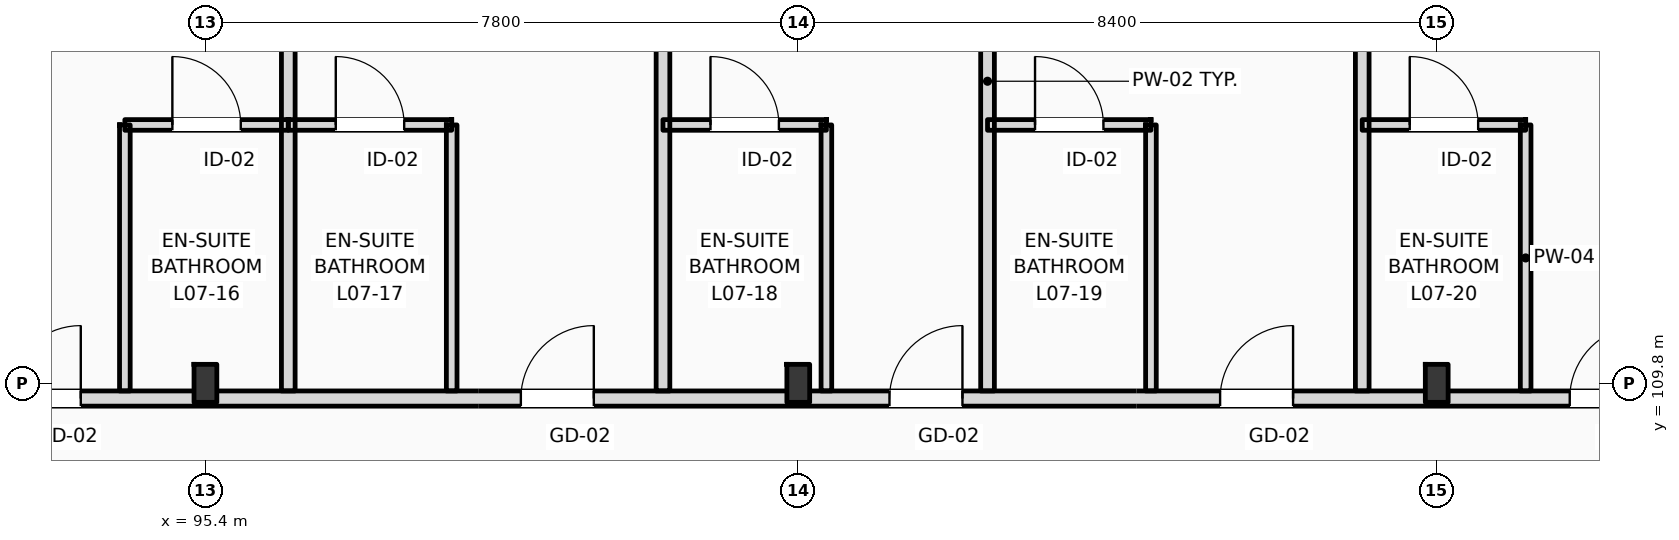
"""IFC4 building model, lengths in metres.
Left out: names, types, materials, properties, quantities, classifications, styles, units other than length and angle.
Written with IfcOpenShell. Run it as: python <this file> out.ifc"""

import sys

from ifc_helpers import new_model, si_unit, direction, frame, frame_2d, origin, origin_2d, place, context, subcontext, project, spatial, rectangle, i_section, extrude, element, fill, save


model = new_model("IFC4")
c1 = context("Model", 3, precision=1e-05, world=origin(), true_north=direction((0.0, 1.0)))
c2 = subcontext(c1, "Body", "Model", "MODEL_VIEW")
j1 = project(units=[si_unit("LENGTHUNIT", "METRE"), si_unit("PLANEANGLEUNIT", "RADIAN")], contexts=[c1])
p1 = place(None, origin())
s1 = spatial("IfcSite", under=j1, at=p1, CompositionType="ELEMENT")
p2 = place(p1, origin())
s2 = spatial("IfcBuilding", under=s1, at=p2, CompositionType="ELEMENT")
p3 = place(p2, frame((0.0, 0.0, 31.8)))
s3 = spatial("IfcBuildingStorey", under=s2, at=p3, CompositionType="ELEMENT", Elevation=31.8)
for number, where, z_axis, x_axis in (
    (1, (95.4, 109.8, 0.0), (0.0, 0.0, 1.0), (1.0, 0.0, 0.0)),
    (2, (103.2, 109.8, 0.0), (0.0, 0.0, 1.0), (1.0, 0.0, 0.0)),
    (3, (111.6, 109.8, 0.0), (0.0, 0.0, 1.0), (1.0, 0.0, 0.0)),
):
    element("IfcColumn", number, at=place(p3, frame(where, z_axis=z_axis, x_axis=x_axis)), inside=s3, PredefinedType="COLUMN", context=c2, shape_type="SweptSolid", body=[
        extrude(i_section(OverallWidth=0.3, OverallDepth=0.5, WebThickness=0.014, FlangeThickness=0.028, FilletRadius=0.027, at=origin_2d()), origin(), (0.0, 0.0, 1.0), 3.6),
    ])
p4 = place(p3, frame((10.65, 109.6, 0.0), z_axis=(0.0, 0.0, 1.0), x_axis=(1.0, 0.0, 0.0)))
e4 = element("IfcWall", 4, at=p4, inside=s3, PredefinedType="PARTITIONING", context=c2, shape_type="SweptSolid", body=[
    extrude(rectangle(XDim=109.21, YDim=0.2, at=frame_2d((54.605, 0.0))), origin(), (0.0, 0.0, 1.0), 2.72),
])
p5 = place(p4, frame((15.825, 0.0, 0.0)))
e5 = element("IfcOpeningElement", 5, at=p5, cuts=e4, PredefinedType="OPENING", context=c2, shape_type="SweptSolid", body=[
    extrude(rectangle(XDim=1.02, YDim=2.2, at=frame_2d((0.51, 1.1))), frame((0.0, 0.11, 0.0), z_axis=(0.0, -1.0, 0.0), x_axis=(1.0, 0.0, 0.0)), (0.0, 0.0, 1.0), 0.22),
])
p6 = place(p4, frame((19.87, 0.0, 0.0)))
e6 = element("IfcOpeningElement", 6, at=p6, cuts=e4, PredefinedType="OPENING", context=c2, shape_type="SweptSolid", body=[
    extrude(rectangle(XDim=1.02, YDim=2.2, at=frame_2d((0.51, 1.1))), frame((0.0, 0.11, 0.0), z_axis=(0.0, -1.0, 0.0), x_axis=(1.0, 0.0, 0.0)), (0.0, 0.0, 1.0), 0.22),
])
p7 = place(p4, frame((24.47, 0.0, 0.0)))
e7 = element("IfcOpeningElement", 7, at=p7, cuts=e4, PredefinedType="OPENING", context=c2, shape_type="SweptSolid", body=[
    extrude(rectangle(XDim=1.02, YDim=2.2, at=frame_2d((0.51, 1.1))), frame((0.0, 0.11, 0.0), z_axis=(0.0, -1.0, 0.0), x_axis=(1.0, 0.0, 0.0)), (0.0, 0.0, 1.0), 0.22),
])
p8 = place(p4, frame((26.92, 0.0, 0.0)))
e8 = element("IfcOpeningElement", 8, at=p8, cuts=e4, PredefinedType="OPENING", context=c2, shape_type="SweptSolid", body=[
    extrude(rectangle(XDim=1.02, YDim=2.2, at=frame_2d((0.51, 1.1))), frame((0.0, 0.11, 0.0), z_axis=(0.0, -1.0, 0.0), x_axis=(1.0, 0.0, 0.0)), (0.0, 0.0, 1.0), 0.22),
])
p9 = place(p4, frame((33.7, 0.0, 0.0)))
e9 = element("IfcOpeningElement", 9, at=p9, cuts=e4, PredefinedType="OPENING", context=c2, shape_type="SweptSolid", body=[
    extrude(rectangle(XDim=0.96, YDim=2.2, at=frame_2d((0.48, 1.1))), frame((0.0, 0.11, 0.0), z_axis=(0.0, -1.0, 0.0), x_axis=(1.0, 0.0, 0.0)), (0.0, 0.0, 1.0), 0.22),
])
p10 = place(p4, frame((35.9, 0.0, 0.0)))
e10 = element("IfcOpeningElement", 10, at=p10, cuts=e4, PredefinedType="OPENING", context=c2, shape_type="SweptSolid", body=[
    extrude(rectangle(XDim=0.96, YDim=2.2, at=frame_2d((0.48, 1.1))), frame((0.0, 0.11, 0.0), z_axis=(0.0, -1.0, 0.0), x_axis=(1.0, 0.0, 0.0)), (0.0, 0.0, 1.0), 0.22),
])
p11 = place(p4, frame((42.9, 0.0, 0.0)))
e11 = element("IfcOpeningElement", 11, at=p11, cuts=e4, PredefinedType="OPENING", context=c2, shape_type="SweptSolid", body=[
    extrude(rectangle(XDim=0.96, YDim=2.2, at=frame_2d((0.48, 1.1))), frame((0.0, 0.11, 0.0), z_axis=(0.0, -1.0, 0.0), x_axis=(1.0, 0.0, 0.0)), (0.0, 0.0, 1.0), 0.22),
])
p12 = place(p4, frame((47.5, 0.0, 0.0)))
e12 = element("IfcOpeningElement", 12, at=p12, cuts=e4, PredefinedType="OPENING", context=c2, shape_type="SweptSolid", body=[
    extrude(rectangle(XDim=0.96, YDim=2.2, at=frame_2d((0.48, 1.1))), frame((0.0, 0.11, 0.0), z_axis=(0.0, -1.0, 0.0), x_axis=(1.0, 0.0, 0.0)), (0.0, 0.0, 1.0), 0.22),
])
p13 = place(p4, frame((49.95, 0.0, 0.0)))
e13 = element("IfcOpeningElement", 13, at=p13, cuts=e4, PredefinedType="OPENING", context=c2, shape_type="SweptSolid", body=[
    extrude(rectangle(XDim=0.96, YDim=2.2, at=frame_2d((0.48, 1.1))), frame((0.0, 0.11, 0.0), z_axis=(0.0, -1.0, 0.0), x_axis=(1.0, 0.0, 0.0)), (0.0, 0.0, 1.0), 0.22),
])
p14 = place(p4, frame((56.7, 0.0, 0.0)))
e14 = element("IfcOpeningElement", 14, at=p14, cuts=e4, PredefinedType="OPENING", context=c2, shape_type="SweptSolid", body=[
    extrude(rectangle(XDim=0.96, YDim=2.2, at=frame_2d((0.48, 1.1))), frame((0.0, 0.11, 0.0), z_axis=(0.0, -1.0, 0.0), x_axis=(1.0, 0.0, 0.0)), (0.0, 0.0, 1.0), 0.22),
])
p15 = place(p4, frame((59.15, 0.0, 0.0)))
e15 = element("IfcOpeningElement", 15, at=p15, cuts=e4, PredefinedType="OPENING", context=c2, shape_type="SweptSolid", body=[
    extrude(rectangle(XDim=0.96, YDim=2.2, at=frame_2d((0.48, 1.1))), frame((0.0, 0.11, 0.0), z_axis=(0.0, -1.0, 0.0), x_axis=(1.0, 0.0, 0.0)), (0.0, 0.0, 1.0), 0.22),
])
p16 = place(p4, frame((65.9, 0.0, 0.0)))
e16 = element("IfcOpeningElement", 16, at=p16, cuts=e4, PredefinedType="OPENING", context=c2, shape_type="SweptSolid", body=[
    extrude(rectangle(XDim=0.96, YDim=2.2, at=frame_2d((0.48, 1.1))), frame((0.0, 0.11, 0.0), z_axis=(0.0, -1.0, 0.0), x_axis=(1.0, 0.0, 0.0)), (0.0, 0.0, 1.0), 0.22),
])
p17 = place(p4, frame((70.5, 0.0, 0.0)))
e17 = element("IfcOpeningElement", 17, at=p17, cuts=e4, PredefinedType="OPENING", context=c2, shape_type="SweptSolid", body=[
    extrude(rectangle(XDim=0.96, YDim=2.2, at=frame_2d((0.48, 1.1))), frame((0.0, 0.11, 0.0), z_axis=(0.0, -1.0, 0.0), x_axis=(1.0, 0.0, 0.0)), (0.0, 0.0, 1.0), 0.22),
])
p18 = place(p4, frame((72.95, 0.0, 0.0)))
e18 = element("IfcOpeningElement", 18, at=p18, cuts=e4, PredefinedType="OPENING", context=c2, shape_type="SweptSolid", body=[
    extrude(rectangle(XDim=0.96, YDim=2.2, at=frame_2d((0.48, 1.1))), frame((0.0, 0.11, 0.0), z_axis=(0.0, -1.0, 0.0), x_axis=(1.0, 0.0, 0.0)), (0.0, 0.0, 1.0), 0.22),
])
p19 = place(p4, frame((79.7, 0.0, 0.0)))
e19 = element("IfcOpeningElement", 19, at=p19, cuts=e4, PredefinedType="OPENING", context=c2, shape_type="SweptSolid", body=[
    extrude(rectangle(XDim=0.96, YDim=2.2, at=frame_2d((0.48, 1.1))), frame((0.0, 0.11, 0.0), z_axis=(0.0, -1.0, 0.0), x_axis=(1.0, 0.0, 0.0)), (0.0, 0.0, 1.0), 0.22),
])
p20 = place(p4, frame((82.15, 0.0, 0.0)))
e20 = element("IfcOpeningElement", 20, at=p20, cuts=e4, PredefinedType="OPENING", context=c2, shape_type="SweptSolid", body=[
    extrude(rectangle(XDim=0.96, YDim=2.2, at=frame_2d((0.48, 1.1))), frame((0.0, 0.11, 0.0), z_axis=(0.0, -1.0, 0.0), x_axis=(1.0, 0.0, 0.0)), (0.0, 0.0, 1.0), 0.22),
])
p21 = place(p4, frame((88.9, 0.0, 0.0)))
e21 = element("IfcOpeningElement", 21, at=p21, cuts=e4, PredefinedType="OPENING", context=c2, shape_type="SweptSolid", body=[
    extrude(rectangle(XDim=0.96, YDim=2.2, at=frame_2d((0.48, 1.1))), frame((0.0, 0.11, 0.0), z_axis=(0.0, -1.0, 0.0), x_axis=(1.0, 0.0, 0.0)), (0.0, 0.0, 1.0), 0.22),
])
p22 = place(p4, frame((93.75, 0.0, 0.0)))
e22 = element("IfcOpeningElement", 22, at=p22, cuts=e4, PredefinedType="OPENING", context=c2, shape_type="SweptSolid", body=[
    extrude(rectangle(XDim=0.96, YDim=2.2, at=frame_2d((0.48, 1.1))), frame((0.0, 0.11, 0.0), z_axis=(0.0, -1.0, 0.0), x_axis=(1.0, 0.0, 0.0)), (0.0, 0.0, 1.0), 0.22),
])
p23 = place(p4, frame((98.1, 0.0, 0.0)))
e23 = element("IfcOpeningElement", 23, at=p23, cuts=e4, PredefinedType="OPENING", context=c2, shape_type="SweptSolid", body=[
    extrude(rectangle(XDim=0.96, YDim=2.2, at=frame_2d((0.48, 1.1))), frame((0.0, 0.11, 0.0), z_axis=(0.0, -1.0, 0.0), x_axis=(1.0, 0.0, 0.0)), (0.0, 0.0, 1.0), 0.22),
])
p24 = place(p4, frame((102.7, 0.0, 0.0)))
e24 = element("IfcOpeningElement", 24, at=p24, cuts=e4, PredefinedType="OPENING", context=c2, shape_type="SweptSolid", body=[
    extrude(rectangle(XDim=0.96, YDim=2.2, at=frame_2d((0.48, 1.1))), frame((0.0, 0.11, 0.0), z_axis=(0.0, -1.0, 0.0), x_axis=(1.0, 0.0, 0.0)), (0.0, 0.0, 1.0), 0.22),
])
p25 = place(p4, frame((105.04, 0.0, 0.0)))
e25 = element("IfcOpeningElement", 25, at=p25, cuts=e4, PredefinedType="OPENING", context=c2, shape_type="SweptSolid", body=[
    extrude(rectangle(XDim=0.96, YDim=2.2, at=frame_2d((0.48, 1.1))), frame((0.0, 0.11, 0.0), z_axis=(0.0, -1.0, 0.0), x_axis=(1.0, 0.0, 0.0)), (0.0, 0.0, 1.0), 0.22),
])
p26 = place(p4, frame((2.716, 0.0, 0.0)))
e26 = element("IfcOpeningElement", 26, at=p26, cuts=e4, PredefinedType="OPENING", context=c2, shape_type="SweptSolid", body=[
    extrude(rectangle(XDim=1.35, YDim=2.25, at=frame_2d((0.675, 1.125))), frame((0.0, 0.11, 0.0), z_axis=(0.0, -1.0, 0.0), x_axis=(1.0, 0.0, 0.0)), (0.0, 0.0, 1.0), 0.22),
])
p27 = place(p4, frame((6.65, 0.0, 0.0)))
e27 = element("IfcOpeningElement", 27, at=p27, cuts=e4, PredefinedType="OPENING", context=c2, shape_type="SweptSolid", body=[
    extrude(rectangle(XDim=1.35, YDim=2.25, at=frame_2d((0.675, 1.125))), frame((0.0, 0.11, 0.0), z_axis=(0.0, -1.0, 0.0), x_axis=(1.0, 0.0, 0.0)), (0.0, 0.0, 1.0), 0.22),
])
p28 = place(p4, frame((10.583, 0.0, 0.0)))
e28 = element("IfcOpeningElement", 28, at=p28, cuts=e4, PredefinedType="OPENING", context=c2, shape_type="SweptSolid", body=[
    extrude(rectangle(XDim=1.35, YDim=2.25, at=frame_2d((0.675, 1.125))), frame((0.0, 0.11, 0.0), z_axis=(0.0, -1.0, 0.0), x_axis=(1.0, 0.0, 0.0)), (0.0, 0.0, 1.0), 0.22),
])
p29 = place(p3, frame((96.49, 109.7, 0.0), z_axis=(0.0, 0.0, 1.0), x_axis=(0.0, 1.0, 0.0)))
e29 = element("IfcWall", 29, at=p29, inside=s3, PredefinedType="PARTITIONING", context=c2, shape_type="SweptSolid", body=[
    extrude(rectangle(XDim=8.15, YDim=0.18, at=frame_2d((4.075, 0.0))), origin(), (0.0, 0.0, 1.0), 3.36),
])
p30 = place(p3, frame((94.34, 109.7, 0.0), z_axis=(0.0, 0.0, 1.0), x_axis=(0.0, 1.0, 0.0)))
e30 = element("IfcWall", 30, at=p30, inside=s3, PredefinedType="PARTITIONING", context=c2, shape_type="SweptSolid", body=[
    extrude(rectangle(XDim=3.5, YDim=0.14, at=frame_2d((1.75, 0.0))), origin(), (0.0, 0.0, 1.0), 3.36),
])
p31 = place(p3, frame((94.34, 113.2, 0.0), z_axis=(0.0, 0.0, 1.0), x_axis=(1.0, 0.0, 0.0)))
e31 = element("IfcWall", 31, at=p31, inside=s3, PredefinedType="PARTITIONING", context=c2, shape_type="SweptSolid", body=[
    extrude(rectangle(XDim=2.15, YDim=0.14, at=frame_2d((1.075, 0.0))), origin(), (0.0, 0.0, 1.0), 3.36),
])
p32 = place(p31, frame((0.625, 0.0, 0.0)))
e32 = element("IfcOpeningElement", 32, at=p32, cuts=e31, PredefinedType="OPENING", context=c2, shape_type="SweptSolid", body=[
    extrude(rectangle(XDim=0.9, YDim=2.1, at=frame_2d((0.45, 1.05))), frame((0.0, 0.08, 0.0), z_axis=(0.0, -1.0, 0.0), x_axis=(1.0, 0.0, 0.0)), (0.0, 0.0, 1.0), 0.16),
])
p33 = place(p3, frame((101.42, 109.7, 0.0), z_axis=(0.0, 0.0, 1.0), x_axis=(0.0, 1.0, 0.0)))
e33 = element("IfcWall", 33, at=p33, inside=s3, PredefinedType="PARTITIONING", context=c2, shape_type="SweptSolid", body=[
    extrude(rectangle(XDim=8.15, YDim=0.18, at=frame_2d((4.075, 0.0))), origin(), (0.0, 0.0, 1.0), 3.36),
])
p34 = place(p3, frame((98.64, 109.7, 0.0), z_axis=(0.0, 0.0, 1.0), x_axis=(0.0, 1.0, 0.0)))
e34 = element("IfcWall", 34, at=p34, inside=s3, PredefinedType="PARTITIONING", context=c2, shape_type="SweptSolid", body=[
    extrude(rectangle(XDim=3.5, YDim=0.14, at=frame_2d((1.75, 0.0))), origin(), (0.0, 0.0, 1.0), 3.36),
])
p35 = place(p3, frame((96.49, 113.2, 0.0), z_axis=(0.0, 0.0, 1.0), x_axis=(1.0, 0.0, 0.0)))
e35 = element("IfcWall", 35, at=p35, inside=s3, PredefinedType="PARTITIONING", context=c2, shape_type="SweptSolid", body=[
    extrude(rectangle(XDim=2.15, YDim=0.14, at=frame_2d((1.075, 0.0))), origin(), (0.0, 0.0, 1.0), 3.36),
])
p36 = place(p35, frame((0.625, 0.0, 0.0)))
e36 = element("IfcOpeningElement", 36, at=p36, cuts=e35, PredefinedType="OPENING", context=c2, shape_type="SweptSolid", body=[
    extrude(rectangle(XDim=0.9, YDim=2.1, at=frame_2d((0.45, 1.05))), frame((0.0, 0.08, 0.0), z_axis=(0.0, -1.0, 0.0), x_axis=(1.0, 0.0, 0.0)), (0.0, 0.0, 1.0), 0.16),
])
p37 = place(p3, frame((105.69, 109.7, 0.0), z_axis=(0.0, 0.0, 1.0), x_axis=(0.0, 1.0, 0.0)))
e37 = element("IfcWall", 37, at=p37, inside=s3, PredefinedType="PARTITIONING", context=c2, shape_type="SweptSolid", body=[
    extrude(rectangle(XDim=8.15, YDim=0.18, at=frame_2d((4.075, 0.0))), origin(), (0.0, 0.0, 1.0), 3.36),
])
p38 = place(p3, frame((103.57, 109.7, 0.0), z_axis=(0.0, 0.0, 1.0), x_axis=(0.0, 1.0, 0.0)))
e38 = element("IfcWall", 38, at=p38, inside=s3, PredefinedType="PARTITIONING", context=c2, shape_type="SweptSolid", body=[
    extrude(rectangle(XDim=3.5, YDim=0.14, at=frame_2d((1.75, 0.0))), origin(), (0.0, 0.0, 1.0), 3.36),
])
p39 = place(p3, frame((101.42, 113.2, 0.0), z_axis=(0.0, 0.0, 1.0), x_axis=(1.0, 0.0, 0.0)))
e39 = element("IfcWall", 39, at=p39, inside=s3, PredefinedType="PARTITIONING", context=c2, shape_type="SweptSolid", body=[
    extrude(rectangle(XDim=2.15, YDim=0.14, at=frame_2d((1.075, 0.0))), origin(), (0.0, 0.0, 1.0), 3.36),
])
p40 = place(p39, frame((0.625, 0.0, 0.0)))
e40 = element("IfcOpeningElement", 40, at=p40, cuts=e39, PredefinedType="OPENING", context=c2, shape_type="SweptSolid", body=[
    extrude(rectangle(XDim=0.9, YDim=2.1, at=frame_2d((0.45, 1.05))), frame((0.0, 0.08, 0.0), z_axis=(0.0, -1.0, 0.0), x_axis=(1.0, 0.0, 0.0)), (0.0, 0.0, 1.0), 0.16),
])
p41 = place(p3, frame((110.62, 109.7, 0.0), z_axis=(0.0, 0.0, 1.0), x_axis=(0.0, 1.0, 0.0)))
e41 = element("IfcWall", 41, at=p41, inside=s3, PredefinedType="PARTITIONING", context=c2, shape_type="SweptSolid", body=[
    extrude(rectangle(XDim=8.15, YDim=0.18, at=frame_2d((4.075, 0.0))), origin(), (0.0, 0.0, 1.0), 3.36),
])
p42 = place(p3, frame((107.84, 109.7, 0.0), z_axis=(0.0, 0.0, 1.0), x_axis=(0.0, 1.0, 0.0)))
e42 = element("IfcWall", 42, at=p42, inside=s3, PredefinedType="PARTITIONING", context=c2, shape_type="SweptSolid", body=[
    extrude(rectangle(XDim=3.5, YDim=0.14, at=frame_2d((1.75, 0.0))), origin(), (0.0, 0.0, 1.0), 3.36),
])
p43 = place(p3, frame((105.69, 113.2, 0.0), z_axis=(0.0, 0.0, 1.0), x_axis=(1.0, 0.0, 0.0)))
e43 = element("IfcWall", 43, at=p43, inside=s3, PredefinedType="PARTITIONING", context=c2, shape_type="SweptSolid", body=[
    extrude(rectangle(XDim=2.15, YDim=0.14, at=frame_2d((1.075, 0.0))), origin(), (0.0, 0.0, 1.0), 3.36),
])
p44 = place(p43, frame((0.625, 0.0, 0.0)))
e44 = element("IfcOpeningElement", 44, at=p44, cuts=e43, PredefinedType="OPENING", context=c2, shape_type="SweptSolid", body=[
    extrude(rectangle(XDim=0.9, YDim=2.1, at=frame_2d((0.45, 1.05))), frame((0.0, 0.08, 0.0), z_axis=(0.0, -1.0, 0.0), x_axis=(1.0, 0.0, 0.0)), (0.0, 0.0, 1.0), 0.16),
])
p45 = place(p3, frame((112.77, 109.7, 0.0), z_axis=(0.0, 0.0, 1.0), x_axis=(0.0, 1.0, 0.0)))
e45 = element("IfcWall", 45, at=p45, inside=s3, PredefinedType="PARTITIONING", context=c2, shape_type="SweptSolid", body=[
    extrude(rectangle(XDim=3.5, YDim=0.14, at=frame_2d((1.75, 0.0))), origin(), (0.0, 0.0, 1.0), 3.36),
])
p46 = place(p3, frame((110.62, 113.2, 0.0), z_axis=(0.0, 0.0, 1.0), x_axis=(1.0, 0.0, 0.0)))
e46 = element("IfcWall", 46, at=p46, inside=s3, PredefinedType="PARTITIONING", context=c2, shape_type="SweptSolid", body=[
    extrude(rectangle(XDim=2.15, YDim=0.14, at=frame_2d((1.075, 0.0))), origin(), (0.0, 0.0, 1.0), 3.36),
])
p47 = place(p46, frame((0.625, 0.0, 0.0)))
e47 = element("IfcOpeningElement", 47, at=p47, cuts=e46, PredefinedType="OPENING", context=c2, shape_type="SweptSolid", body=[
    extrude(rectangle(XDim=0.9, YDim=2.1, at=frame_2d((0.45, 1.05))), frame((0.0, 0.08, 0.0), z_axis=(0.0, -1.0, 0.0), x_axis=(1.0, 0.0, 0.0)), (0.0, 0.0, 1.0), 0.16),
])
p48 = place(p20, origin())
e48 = element("IfcDoor", 48, at=p48, inside=s3, OperationType="SINGLE_SWING_RIGHT", PredefinedType="DOOR", context=c2, shape_type="SweptSolid", body=[
    extrude(rectangle(XDim=0.96, YDim=2.2, at=frame_2d((0.48, 1.1))), frame((0.0, 0.025, 0.0), z_axis=(0.0, -1.0, 0.0), x_axis=(1.0, 0.0, 0.0)), (0.0, 0.0, 1.0), 0.05),
])
fill(e20, e48)
p49 = place(p32, origin())
e49 = element("IfcDoor", 49, at=p49, inside=s3, OperationType="SINGLE_SWING_LEFT", PredefinedType="DOOR", context=c2, shape_type="SweptSolid", body=[
    extrude(rectangle(XDim=0.9, YDim=2.1, at=frame_2d((0.45, 1.05))), frame((0.0, 0.025, 0.0), z_axis=(0.0, -1.0, 0.0), x_axis=(1.0, 0.0, 0.0)), (0.0, 0.0, 1.0), 0.05),
])
fill(e32, e49)
p50 = place(p21, origin())
e50 = element("IfcDoor", 50, at=p50, inside=s3, OperationType="SINGLE_SWING_RIGHT", PredefinedType="DOOR", context=c2, shape_type="SweptSolid", body=[
    extrude(rectangle(XDim=0.96, YDim=2.2, at=frame_2d((0.48, 1.1))), frame((0.0, 0.025, 0.0), z_axis=(0.0, -1.0, 0.0), x_axis=(1.0, 0.0, 0.0)), (0.0, 0.0, 1.0), 0.05),
])
fill(e21, e50)
p51 = place(p36, origin())
e51 = element("IfcDoor", 51, at=p51, inside=s3, OperationType="SINGLE_SWING_LEFT", PredefinedType="DOOR", context=c2, shape_type="SweptSolid", body=[
    extrude(rectangle(XDim=0.9, YDim=2.1, at=frame_2d((0.45, 1.05))), frame((0.0, 0.025, 0.0), z_axis=(0.0, -1.0, 0.0), x_axis=(1.0, 0.0, 0.0)), (0.0, 0.0, 1.0), 0.05),
])
fill(e36, e51)
p52 = place(p22, origin())
e52 = element("IfcDoor", 52, at=p52, inside=s3, OperationType="SINGLE_SWING_RIGHT", PredefinedType="DOOR", context=c2, shape_type="SweptSolid", body=[
    extrude(rectangle(XDim=0.96, YDim=2.2, at=frame_2d((0.48, 1.1))), frame((0.0, 0.025, 0.0), z_axis=(0.0, -1.0, 0.0), x_axis=(1.0, 0.0, 0.0)), (0.0, 0.0, 1.0), 0.05),
])
fill(e22, e52)
p53 = place(p40, origin())
e53 = element("IfcDoor", 53, at=p53, inside=s3, OperationType="SINGLE_SWING_LEFT", PredefinedType="DOOR", context=c2, shape_type="SweptSolid", body=[
    extrude(rectangle(XDim=0.9, YDim=2.1, at=frame_2d((0.45, 1.05))), frame((0.0, 0.025, 0.0), z_axis=(0.0, -1.0, 0.0), x_axis=(1.0, 0.0, 0.0)), (0.0, 0.0, 1.0), 0.05),
])
fill(e40, e53)
p54 = place(p23, origin())
e54 = element("IfcDoor", 54, at=p54, inside=s3, OperationType="SINGLE_SWING_RIGHT", PredefinedType="DOOR", context=c2, shape_type="SweptSolid", body=[
    extrude(rectangle(XDim=0.96, YDim=2.2, at=frame_2d((0.48, 1.1))), frame((0.0, 0.025, 0.0), z_axis=(0.0, -1.0, 0.0), x_axis=(1.0, 0.0, 0.0)), (0.0, 0.0, 1.0), 0.05),
])
fill(e23, e54)
p55 = place(p44, origin())
e55 = element("IfcDoor", 55, at=p55, inside=s3, OperationType="SINGLE_SWING_LEFT", PredefinedType="DOOR", context=c2, shape_type="SweptSolid", body=[
    extrude(rectangle(XDim=0.9, YDim=2.1, at=frame_2d((0.45, 1.05))), frame((0.0, 0.025, 0.0), z_axis=(0.0, -1.0, 0.0), x_axis=(1.0, 0.0, 0.0)), (0.0, 0.0, 1.0), 0.05),
])
fill(e44, e55)
p56 = place(p24, origin())
e56 = element("IfcDoor", 56, at=p56, inside=s3, OperationType="SINGLE_SWING_RIGHT", PredefinedType="DOOR", context=c2, shape_type="SweptSolid", body=[
    extrude(rectangle(XDim=0.96, YDim=2.2, at=frame_2d((0.48, 1.1))), frame((0.0, 0.025, 0.0), z_axis=(0.0, -1.0, 0.0), x_axis=(1.0, 0.0, 0.0)), (0.0, 0.0, 1.0), 0.05),
])
fill(e24, e56)
p57 = place(p47, origin())
e57 = element("IfcDoor", 57, at=p57, inside=s3, OperationType="SINGLE_SWING_LEFT", PredefinedType="DOOR", context=c2, shape_type="SweptSolid", body=[
    extrude(rectangle(XDim=0.9, YDim=2.1, at=frame_2d((0.45, 1.05))), frame((0.0, 0.025, 0.0), z_axis=(0.0, -1.0, 0.0), x_axis=(1.0, 0.0, 0.0)), (0.0, 0.0, 1.0), 0.05),
])
fill(e47, e57)
save(model, sys.argv[1])
